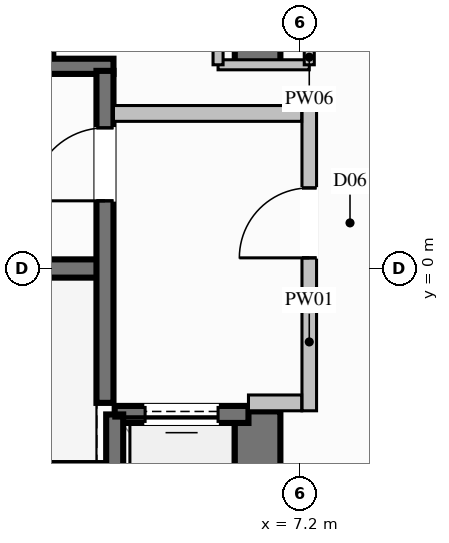
"""IFC4 building model, lengths in metres.
Left out: names, types, materials, properties, quantities, classifications, styles, units other than length and angle.
Written with IfcOpenShell. Run it as: python <this file> out.ifc"""

import sys

from ifc_helpers import new_model, si_unit, direction, frame, frame_2d, origin, place, context, subcontext, project, spatial, rectangle, extrude, element, fill, save


model = new_model("IFC4")
c1 = context("Model", 3, precision=1e-05, world=origin(), true_north=direction((0.0, 1.0)))
c2 = subcontext(c1, "Body", "Model", "MODEL_VIEW")
j1 = project(units=[si_unit("LENGTHUNIT", "METRE"), si_unit("PLANEANGLEUNIT", "RADIAN")], contexts=[c1])
p1 = place(None, origin())
s1 = spatial("IfcSite", under=j1, at=p1, CompositionType="ELEMENT")
p2 = place(p1, origin())
s2 = spatial("IfcBuilding", under=s1, at=p2, CompositionType="ELEMENT")
p3 = place(p2, frame((0.0, 0.0, 42.8)))
s3 = spatial("IfcBuildingStorey", under=s2, at=p3, CompositionType="ELEMENT", Elevation=42.8)
p4 = place(p3, frame((-3.99, 0.0, 0.0), z_axis=(0.0, 0.0, 1.0), x_axis=(1.0, 0.0, 0.0)))
e1 = element("IfcWall", 1, at=p4, inside=s3, PredefinedType="SHEAR", context=c2, shape_type="SweptSolid", body=[
    extrude(rectangle(XDim=7.98, YDim=0.3, at=frame_2d((3.99, 0.0))), origin(), (0.0, 0.0, 1.0), 3.6),
])
for number, where, z_axis, x_axis in (
    (2, (-4.13, -3.325, 0.0), (0.0, 0.0, 1.0), (1.0, 0.0, 0.0)),
    (3, (-4.13, 3.325, 0.0), (0.0, 0.0, 1.0), (1.0, 0.0, 0.0)),
):
    element("IfcWall", number, at=place(p3, frame(where, z_axis=z_axis, x_axis=x_axis)), inside=s3, PredefinedType="SOLIDWALL", context=c2, shape_type="SweptSolid", body=[
        extrude(rectangle(XDim=8.26, YDim=0.25, at=frame_2d((4.13, 0.0))), origin(), (0.0, 0.0, 1.0), 3.6),
    ])
p5 = place(p3, frame((6.5, -6.475, 0.0), z_axis=(0.0, 0.0, 1.0), x_axis=(0.0, 1.0, 0.0)))
e4 = element("IfcWall", 4, at=p5, inside=s3, PredefinedType="SHEAR", context=c2, shape_type="SweptSolid", body=[
    extrude(rectangle(XDim=4.125, YDim=0.75, at=frame_2d((2.062, 0.0))), origin(), (0.0, 0.0, 1.0), 3.6),
])
p6 = place(p3, frame((6.5, 3.35, 0.0), z_axis=(0.0, 0.0, 1.0), x_axis=(0.0, 1.0, 0.0)))
e5 = element("IfcWall", 5, at=p6, inside=s3, PredefinedType="SHEAR", context=c2, shape_type="SweptSolid", body=[
    extrude(rectangle(XDim=3.125, YDim=0.75, at=frame_2d((1.562, 0.0))), origin(), (0.0, 0.0, 1.0), 3.6),
])
p7 = place(p3, frame((3.0, 3.5, 0.0), z_axis=(0.0, 0.0, 1.0), x_axis=(0.0, 1.0, 0.0)))
e6 = element("IfcWall", 6, at=p7, inside=s3, PredefinedType="SOLIDWALL", context=c2, shape_type="SweptSolid", body=[
    extrude(rectangle(XDim=2.5, YDim=0.28, at=frame_2d((1.25, 0.0))), origin(), (0.0, 0.0, 1.0), 3.34),
])
p8 = place(p3, frame((6.35, -2.4, 0.0), z_axis=(0.0, 0.0, 1.0), x_axis=(-1.0, 0.0, 0.0)))
e7 = element("IfcWall", 7, at=p8, inside=s3, PredefinedType="SOLIDWALL", context=c2, shape_type="SweptSolid", body=[
    extrude(rectangle(XDim=2.2, YDim=0.28, at=frame_2d((1.1, 0.0))), origin(), (0.0, 0.0, 1.0), 3.34),
])
p9 = place(p8, frame((0.5, 0.0, 0.0)))
e8 = element("IfcOpeningElement", 8, at=p9, cuts=e7, PredefinedType="OPENING", context=c2, shape_type="SweptSolid", body=[
    extrude(rectangle(XDim=1.2, YDim=2.2, at=frame_2d((0.6, 1.1))), frame((0.0, 0.15, 0.0), z_axis=(0.0, -1.0, 0.0), x_axis=(1.0, 0.0, 0.0)), (0.0, 0.0, 1.0), 0.3),
])
p10 = place(p3, frame((4.15, -2.4, 0.0), z_axis=(0.0, 0.0, 1.0), x_axis=(0.0, -1.0, 0.0)))
e9 = element("IfcWall", 9, at=p10, inside=s3, PredefinedType="SOLIDWALL", context=c2, shape_type="SweptSolid", body=[
    extrude(rectangle(XDim=2.7, YDim=0.28, at=frame_2d((1.35, 0.0))), origin(), (0.0, 0.0, 1.0), 3.34),
])
p11 = place(p3, frame((3.99, -2.21, 0.0), z_axis=(0.0, 0.0, 1.0), x_axis=(0.0, 1.0, 0.0)))
e10 = element("IfcWall", 10, at=p11, inside=s3, PredefinedType="SOLIDWALL", context=c2, shape_type="SweptSolid", body=[
    extrude(rectangle(XDim=5.46, YDim=0.28, at=frame_2d((2.73, 0.0))), origin(), (0.0, 0.0, 1.0), 3.34),
])
p12 = place(p11, frame((3.323, 0.0, 0.0)))
e11 = element("IfcOpeningElement", 11, at=p12, cuts=e10, PredefinedType="OPENING", context=c2, shape_type="SweptSolid", body=[
    extrude(rectangle(XDim=1.2, YDim=2.2, at=frame_2d((0.6, 1.1))), frame((0.0, 0.15, 0.0), z_axis=(0.0, -1.0, 0.0), x_axis=(1.0, 0.0, 0.0)), (0.0, 0.0, 1.0), 0.3),
])
p13 = place(p3, frame((7.35, -2.34, 0.0), z_axis=(0.0, 0.0, 1.0), x_axis=(0.0, 1.0, 0.0)))
e12 = element("IfcWall", 12, at=p13, inside=s3, PredefinedType="PARTITIONING", context=c2, shape_type="SweptSolid", body=[
    extrude(rectangle(XDim=5.02, YDim=0.24, at=frame_2d((2.51, 0.0))), origin(), (0.0, 0.0, 1.0), 2.425),
])
p14 = place(p13, frame((2.515, 0.0, 0.0)))
e13 = element("IfcOpeningElement", 13, at=p14, cuts=e12, PredefinedType="OPENING", context=c2, shape_type="SweptSolid", body=[
    extrude(rectangle(XDim=1.15, YDim=2.2, at=frame_2d((0.575, 1.1))), frame((0.0, 0.13, 0.0), z_axis=(0.0, -1.0, 0.0), x_axis=(1.0, 0.0, 0.0)), (0.0, 0.0, 1.0), 0.26),
])
p15 = place(p3, frame((6.35, -2.21, 0.0), z_axis=(0.0, 0.0, 1.0), x_axis=(1.0, 0.0, 0.0)))
e14 = element("IfcWall", 14, at=p15, inside=s3, PredefinedType="PARTITIONING", context=c2, shape_type="SweptSolid", body=[
    extrude(rectangle(XDim=0.875, YDim=0.26, at=frame_2d((0.438, 0.0))), origin(), (0.0, 0.0, 1.0), 3.34),
])
p16 = place(p3, frame((4.13, 2.55, 0.0), z_axis=(0.0, 0.0, 1.0), x_axis=(1.0, 0.0, 0.0)))
e15 = element("IfcWall", 15, at=p16, inside=s3, PredefinedType="PARTITIONING", context=c2, shape_type="SweptSolid", body=[
    extrude(rectangle(XDim=3.095, YDim=0.26, at=frame_2d((1.548, 0.0))), origin(), (0.0, 0.0, 1.0), 3.34),
])
p17 = place(p3, frame((5.85, 3.35, 0.0), z_axis=(0.0, 0.0, 1.0), x_axis=(1.0, 0.0, 0.0)))
e16 = element("IfcWall", 16, at=p17, inside=s3, PredefinedType="PARTITIONING", context=c2, shape_type="SweptSolid", body=[
    extrude(rectangle(XDim=1.5, YDim=0.165, at=frame_2d((0.75, 0.0))), origin(), (0.0, 0.0, 1.0), 3.34),
])
p18 = place(p3, frame((7.35, 3.35, 0.0), z_axis=(0.0, 0.0, 1.0), x_axis=(0.0, 1.0, 0.0)))
e17 = element("IfcWall", 17, at=p18, inside=s3, PredefinedType="PARTITIONING", context=c2, shape_type="SweptSolid", body=[
    extrude(rectangle(XDim=1.95, YDim=0.165, at=frame_2d((0.975, 0.0))), origin(), (0.0, 0.0, 1.0), 3.34),
])
p19 = place(p18, frame((0.5, 0.0, 0.0)))
e18 = element("IfcOpeningElement", 18, at=p19, cuts=e17, PredefinedType="OPENING", context=c2, shape_type="SweptSolid", body=[
    extrude(rectangle(XDim=0.95, YDim=2.1, at=frame_2d((0.475, 1.05))), frame((0.0, 0.093, 0.0), z_axis=(0.0, -1.0, 0.0), x_axis=(1.0, 0.0, 0.0)), (0.0, 0.0, 1.0), 0.185),
])
p20 = place(p3, frame((5.85, 5.3, 0.0), z_axis=(0.0, 0.0, 1.0), x_axis=(0.0, -1.0, 0.0)))
e19 = element("IfcWall", 19, at=p20, inside=s3, PredefinedType="PARTITIONING", context=c2, shape_type="SweptSolid", body=[
    extrude(rectangle(XDim=1.95, YDim=0.165, at=frame_2d((0.975, 0.0))), origin(), (0.0, 0.0, 1.0), 2.425),
])
p21 = place(p9, origin())
e20 = element("IfcDoor", 20, at=p21, inside=s3, OperationType="SLIDING_TO_LEFT", PredefinedType="DOOR", context=c2, shape_type="SweptSolid", body=[
    extrude(rectangle(XDim=1.2, YDim=2.2, at=frame_2d((0.6, 1.1))), frame((0.0, 0.025, 0.0), z_axis=(0.0, -1.0, 0.0), x_axis=(1.0, 0.0, 0.0)), (0.0, 0.0, 1.0), 0.05),
])
fill(e8, e20)
p22 = place(p12, origin())
e21 = element("IfcDoor", 21, at=p22, inside=s3, OperationType="SINGLE_SWING_LEFT", PredefinedType="DOOR", context=c2, shape_type="SweptSolid", body=[
    extrude(rectangle(XDim=1.2, YDim=2.2, at=frame_2d((0.6, 1.1))), frame((0.0, 0.025, 0.0), z_axis=(0.0, -1.0, 0.0), x_axis=(1.0, 0.0, 0.0)), (0.0, 0.0, 1.0), 0.05),
])
fill(e11, e21)
p23 = place(p14, origin())
e22 = element("IfcDoor", 22, at=p23, inside=s3, OperationType="SINGLE_SWING_LEFT", PredefinedType="DOOR", context=c2, shape_type="SweptSolid", body=[
    extrude(rectangle(XDim=1.15, YDim=2.2, at=frame_2d((0.575, 1.1))), frame((0.0, 0.025, 0.0), z_axis=(0.0, -1.0, 0.0), x_axis=(1.0, 0.0, 0.0)), (0.0, 0.0, 1.0), 0.05),
])
fill(e13, e22)
save(model, sys.argv[1])
